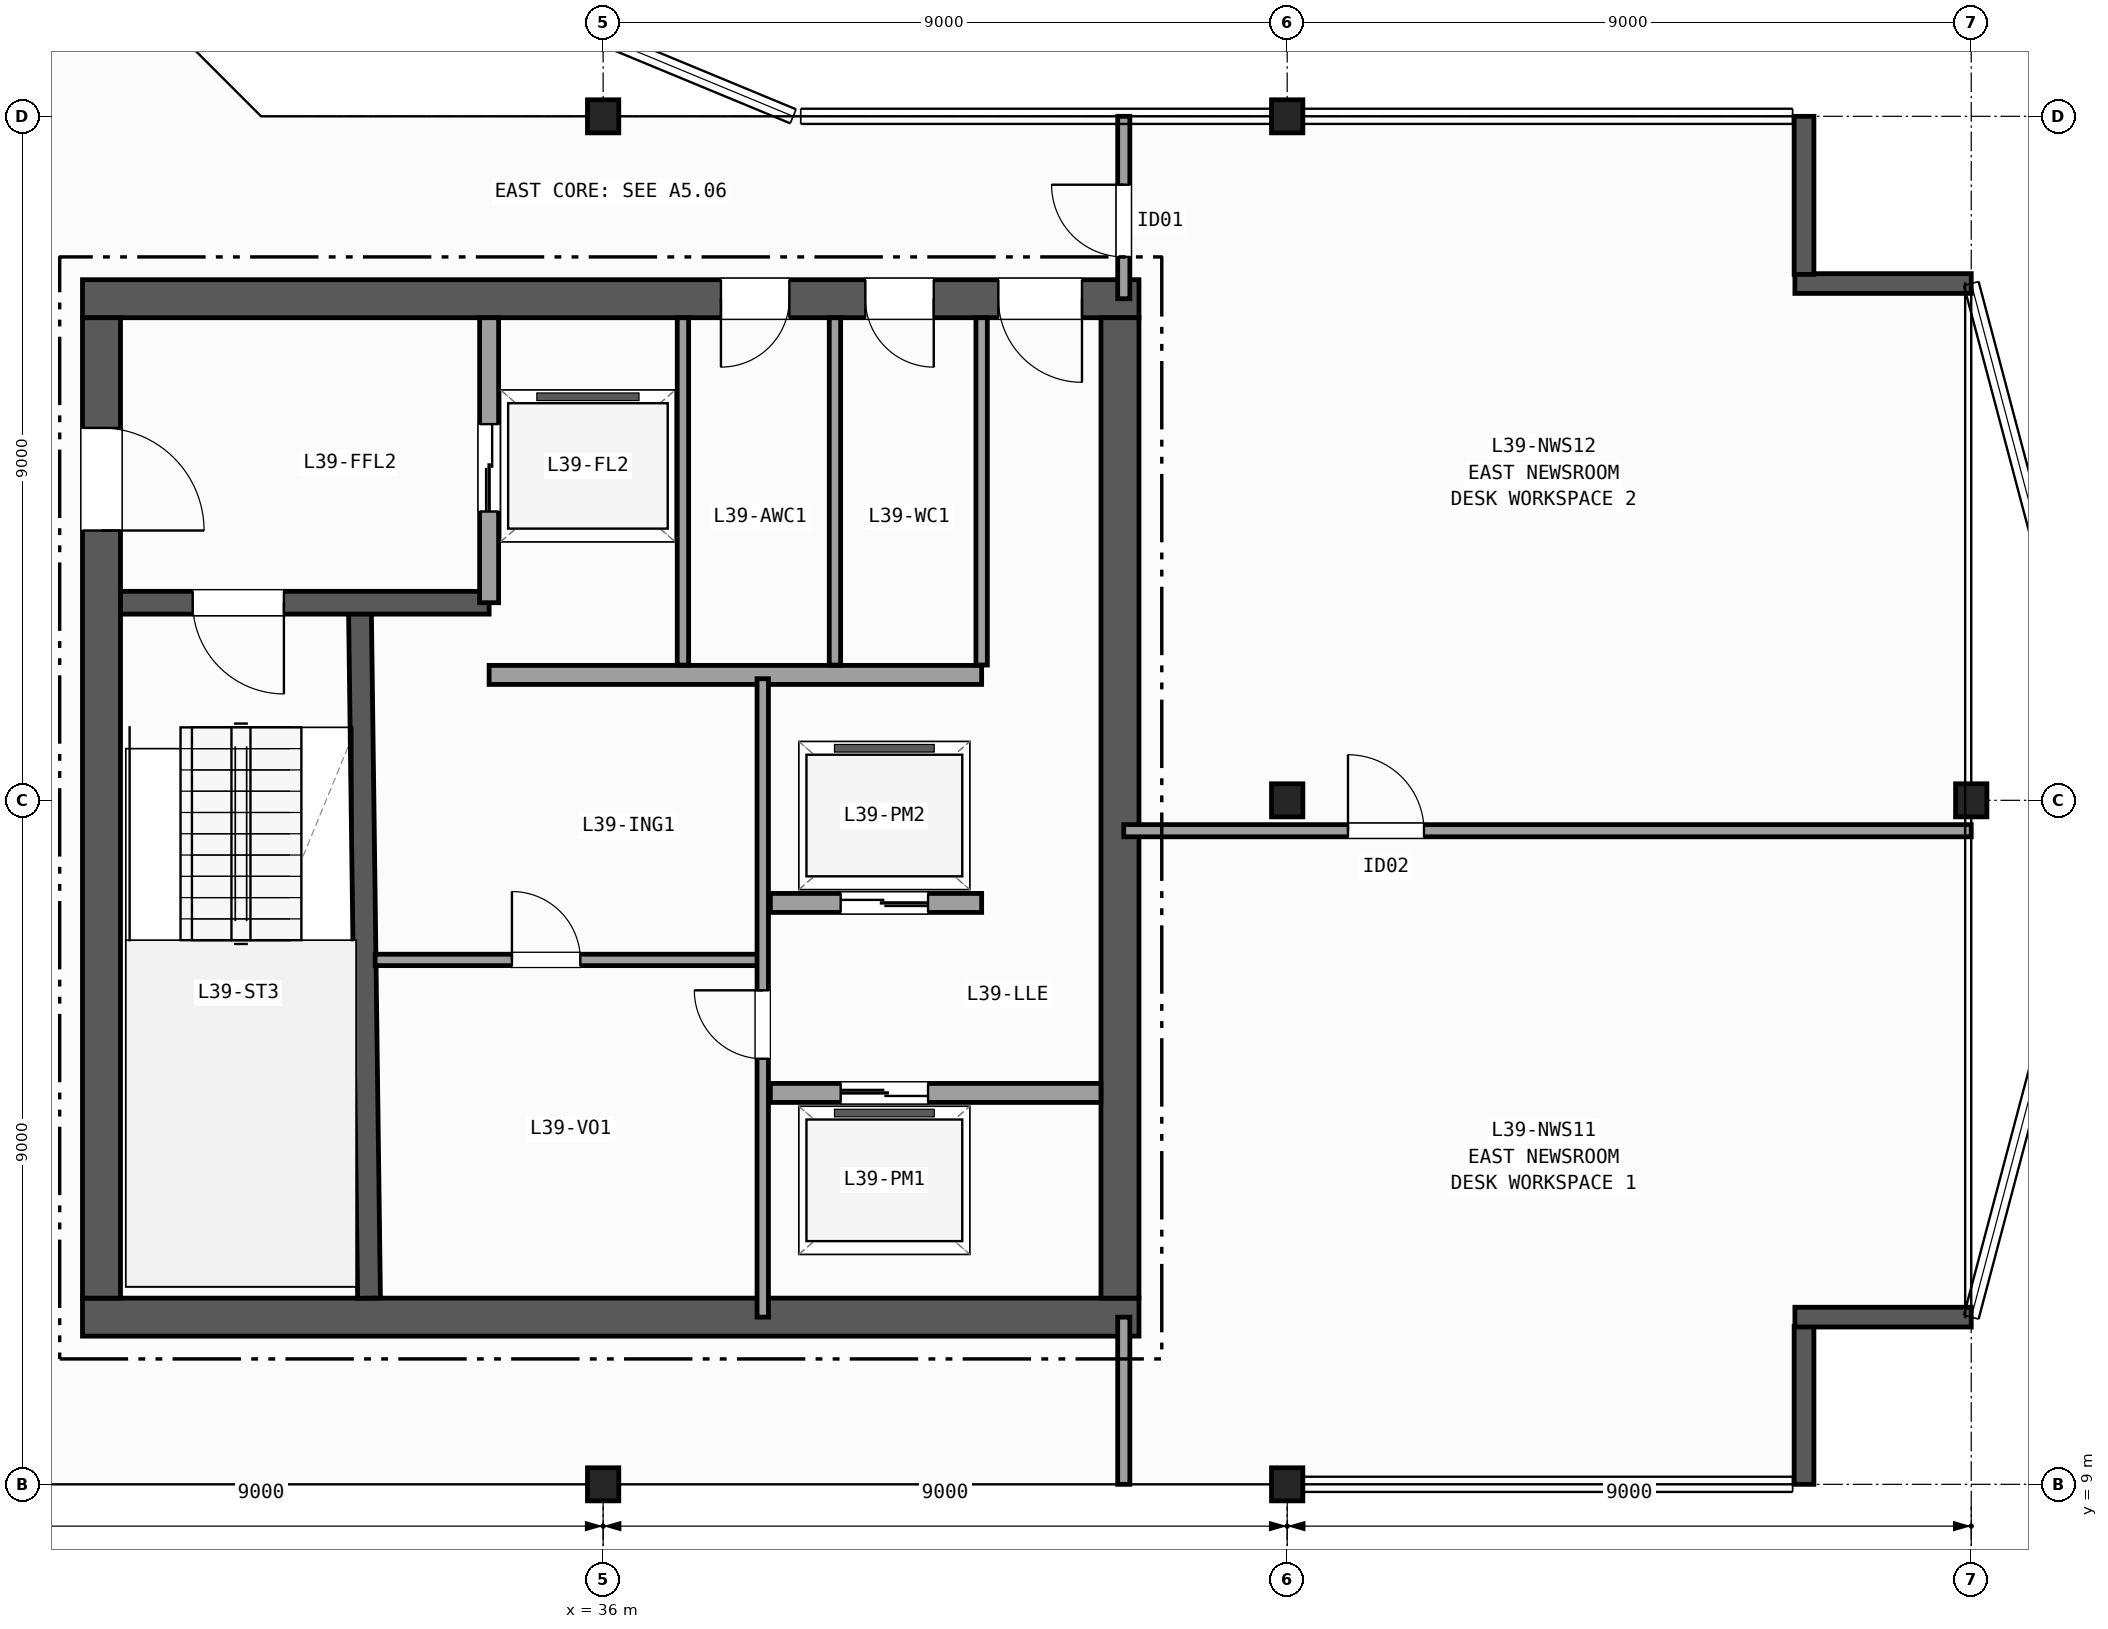
"""IFC4 building model, lengths in metres.
Left out: names, types, materials, properties, quantities, classifications, styles, units other than length and angle.
Written with IfcOpenShell. Run it as: python <this file> out.ifc"""

import sys

from ifc_helpers import new_model, si_unit, direction, frame, frame_2d, origin, origin_2d, place, context, subcontext, project, spatial, rectangle, i_section, extrude, element, fill, save


model = new_model("IFC4")
c1 = context("Model", 3, precision=1e-05, world=origin(), true_north=direction((0.0, 1.0)))
c2 = subcontext(c1, "Body", "Model", "MODEL_VIEW")
j1 = project(units=[si_unit("LENGTHUNIT", "METRE"), si_unit("PLANEANGLEUNIT", "RADIAN")], contexts=[c1])
p1 = place(None, origin())
s1 = spatial("IfcSite", under=j1, at=p1, CompositionType="ELEMENT")
p2 = place(p1, origin())
s2 = spatial("IfcBuilding", under=s1, at=p2, CompositionType="ELEMENT")
p3 = place(p2, frame((0.0, 0.0, 158.1)))
s3 = spatial("IfcBuildingStorey", under=s2, at=p3, CompositionType="ELEMENT", Elevation=158.1)
for number, where, z_axis, x_axis in (
    (1, (36.0, 9.0, 0.0), (0.0, 0.0, 1.0), (1.0, 0.0, 0.0)),
    (2, (36.0, 27.0, 0.0), (0.0, 0.0, 1.0), (1.0, 0.0, 0.0)),
    (3, (45.0, 9.0, 0.0), (0.0, 0.0, 1.0), (1.0, 0.0, 0.0)),
    (4, (45.0, 18.0, 0.0), (0.0, 0.0, 1.0), (1.0, 0.0, 0.0)),
    (5, (45.0, 27.0, 0.0), (0.0, 0.0, 1.0), (1.0, 0.0, 0.0)),
    (6, (54.0, 18.0, 0.0), (0.0, 0.0, 1.0), (1.0, 0.0, 0.0)),
):
    element("IfcColumn", number, at=place(p3, frame(where, z_axis=z_axis, x_axis=x_axis)), inside=s3, PredefinedType="COLUMN", context=c2, shape_type="SweptSolid", body=[
        extrude(i_section(OverallWidth=0.412, OverallDepth=0.435, WebThickness=0.036, FlangeThickness=0.057, FilletRadius=0.015, at=origin_2d()), origin(), (0.0, 0.0, 1.0), 3.7),
    ])
p4 = place(p3, frame((51.8, 9.0, 0.0), z_axis=(0.0, 0.0, 1.0), x_axis=(0.0, 1.0, 0.0)))
e7 = element("IfcWall", 7, at=p4, inside=s3, PredefinedType="SOLIDWALL", context=c2, shape_type="SweptSolid", body=[
    extrude(rectangle(XDim=2.08, YDim=0.26, at=frame_2d((1.04, 0.0))), origin(), (0.0, 0.0, 1.0), 3.42),
])
for number, where, z_axis, x_axis in (
    (8, (51.68, 11.2, 0.0), (0.0, 0.0, 1.0), (1.0, 0.0, 0.0)),
    (9, (54.0, 24.8, 0.0), (0.0, 0.0, 1.0), (-1.0, 0.0, 0.0)),
):
    element("IfcWall", number, at=place(p3, frame(where, z_axis=z_axis, x_axis=x_axis)), inside=s3, PredefinedType="SOLIDWALL", context=c2, shape_type="SweptSolid", body=[
        extrude(rectangle(XDim=2.32, YDim=0.26, at=frame_2d((1.16, 0.0))), origin(), (0.0, 0.0, 1.0), 3.42),
    ])
p5 = place(p3, frame((51.8, 24.92, 0.0), z_axis=(0.0, 0.0, 1.0), x_axis=(0.0, 1.0, 0.0)))
e10 = element("IfcWall", 10, at=p5, inside=s3, PredefinedType="SOLIDWALL", context=c2, shape_type="SweptSolid", body=[
    extrude(rectangle(XDim=2.08, YDim=0.26, at=frame_2d((1.04, 0.0))), origin(), (0.0, 0.0, 1.0), 3.42),
])
p6 = place(p3, frame((29.15, 11.2, 0.0), z_axis=(0.0, 0.0, 1.0), x_axis=(1.0, 0.0, 0.0)))
e11 = element("IfcWall", 11, at=p6, inside=s3, PredefinedType="SHEAR", context=c2, shape_type="SweptSolid", body=[
    extrude(rectangle(XDim=13.9, YDim=0.5, at=frame_2d((6.95, 0.0))), origin(), (0.0, 0.0, 1.0), 3.42),
])
p7 = place(p3, frame((43.05, 24.6, 0.0), z_axis=(0.0, 0.0, 1.0), x_axis=(-1.0, 0.0, 0.0)))
e12 = element("IfcWall", 12, at=p7, inside=s3, PredefinedType="SHEAR", context=c2, shape_type="SweptSolid", body=[
    extrude(rectangle(XDim=13.9, YDim=0.5, at=frame_2d((6.95, 0.0))), origin(), (0.0, 0.0, 1.0), 3.42),
])
p8 = place(p7, frame((0.75, 0.0, 0.0)))
e13 = element("IfcOpeningElement", 13, at=p8, cuts=e12, PredefinedType="OPENING", context=c2, shape_type="SweptSolid", body=[
    extrude(rectangle(XDim=1.1, YDim=2.15, at=frame_2d((0.55, 1.075))), frame((0.0, 0.26, 0.0), z_axis=(0.0, -1.0, 0.0), x_axis=(1.0, 0.0, 0.0)), (0.0, 0.0, 1.0), 0.52),
])
p9 = place(p7, frame((2.7, 0.0, 0.0)))
e14 = element("IfcOpeningElement", 14, at=p9, cuts=e12, PredefinedType="OPENING", context=c2, shape_type="SweptSolid", body=[
    extrude(rectangle(XDim=0.9, YDim=2.1, at=frame_2d((0.45, 1.05))), frame((0.0, 0.26, 0.0), z_axis=(0.0, -1.0, 0.0), x_axis=(1.0, 0.0, 0.0)), (0.0, 0.0, 1.0), 0.52),
])
p10 = place(p7, frame((4.6, 0.0, 0.0)))
e15 = element("IfcOpeningElement", 15, at=p10, cuts=e12, PredefinedType="OPENING", context=c2, shape_type="SweptSolid", body=[
    extrude(rectangle(XDim=0.9, YDim=2.1, at=frame_2d((0.45, 1.05))), frame((0.0, 0.26, 0.0), z_axis=(0.0, -1.0, 0.0), x_axis=(1.0, 0.0, 0.0)), (0.0, 0.0, 1.0), 0.52),
])
p11 = place(p3, frame((29.4, 24.35, 0.0), z_axis=(0.0, 0.0, 1.0), x_axis=(0.0, -1.0, 0.0)))
e16 = element("IfcWall", 16, at=p11, inside=s3, PredefinedType="SHEAR", context=c2, shape_type="SweptSolid", body=[
    extrude(rectangle(XDim=12.9, YDim=0.5, at=frame_2d((6.45, 0.0))), origin(), (0.0, 0.0, 1.0), 3.42),
])
p12 = place(p11, frame((1.45, 0.0, 0.0)))
e17 = element("IfcOpeningElement", 17, at=p12, cuts=e16, PredefinedType="OPENING", context=c2, shape_type="SweptSolid", body=[
    extrude(rectangle(XDim=1.35, YDim=2.15, at=frame_2d((0.675, 1.075))), frame((0.0, 0.26, 0.0), z_axis=(0.0, -1.0, 0.0), x_axis=(1.0, 0.0, 0.0)), (0.0, 0.0, 1.0), 0.52),
])
p13 = place(p3, frame((42.8, 11.45, 0.0), z_axis=(0.0, 0.0, 1.0), x_axis=(0.0, 1.0, 0.0)))
e18 = element("IfcWall", 18, at=p13, inside=s3, PredefinedType="SHEAR", context=c2, shape_type="SweptSolid", body=[
    extrude(rectangle(XDim=12.9, YDim=0.5, at=frame_2d((6.45, 0.0))), origin(), (0.0, 0.0, 1.0), 3.42),
])
p14 = place(p3, frame((32.92, 11.45, 0.0), z_axis=(0.0, 0.0, 1.0), x_axis=(-0.013171578211, 0.999913251001, 0.0)))
e19 = element("IfcWall", 19, at=p14, inside=s3, PredefinedType="SHEAR", context=c2, shape_type="SweptSolid", body=[
    extrude(rectangle(XDim=9.101, YDim=0.3, at=frame_2d((4.55, 0.0))), origin(), (0.0, 0.0, 1.0), 3.42),
])
p15 = place(p3, frame((34.5, 20.6, 0.0), z_axis=(0.0, 0.0, 1.0), x_axis=(-1.0, 0.0, 0.0)))
e20 = element("IfcWall", 20, at=p15, inside=s3, PredefinedType="SHEAR", context=c2, shape_type="SweptSolid", body=[
    extrude(rectangle(XDim=4.85, YDim=0.3, at=frame_2d((2.425, 0.0))), origin(), (0.0, 0.0, 1.0), 3.42),
])
p16 = place(p15, frame((2.7, 0.0, 0.0)))
e21 = element("IfcOpeningElement", 21, at=p16, cuts=e20, PredefinedType="OPENING", context=c2, shape_type="SweptSolid", body=[
    extrude(rectangle(XDim=1.2, YDim=2.15, at=frame_2d((0.6, 1.075))), frame((0.0, 0.16, 0.0), z_axis=(0.0, -1.0, 0.0), x_axis=(1.0, 0.0, 0.0)), (0.0, 0.0, 1.0), 0.32),
])
p17 = place(p3, frame((34.5, 20.6, 0.0), z_axis=(0.0, 0.0, 1.0), x_axis=(0.0, 1.0, 0.0)))
e22 = element("IfcWall", 22, at=p17, inside=s3, PredefinedType="PARTITIONING", context=c2, shape_type="SweptSolid", body=[
    extrude(rectangle(XDim=3.75, YDim=0.25, at=frame_2d((1.875, 0.0))), origin(), (0.0, 0.0, 1.0), 3.42),
])
p18 = place(p17, frame((1.2, 0.0, 0.0)))
e23 = element("IfcOpeningElement", 23, at=p18, cuts=e22, PredefinedType="OPENING", context=c2, shape_type="SweptSolid", body=[
    extrude(rectangle(XDim=1.15, YDim=2.15, at=frame_2d((0.575, 1.075))), frame((0.0, 0.135, 0.0), z_axis=(0.0, -1.0, 0.0), x_axis=(1.0, 0.0, 0.0)), (0.0, 0.0, 1.0), 0.27),
])
p19 = place(p3, frame((34.5, 19.65, 0.0), z_axis=(0.0, 0.0, 1.0), x_axis=(1.0, 0.0, 0.0)))
e24 = element("IfcWall", 24, at=p19, inside=s3, PredefinedType="PARTITIONING", context=c2, shape_type="SweptSolid", body=[
    extrude(rectangle(XDim=6.48, YDim=0.25, at=frame_2d((3.24, 0.0))), origin(), (0.0, 0.0, 1.0), 3.42),
])
p20 = place(p3, frame((38.2, 14.15, 0.0), z_axis=(0.0, 0.0, 1.0), x_axis=(1.0, 0.0, 0.0)))
e25 = element("IfcWall", 25, at=p20, inside=s3, PredefinedType="PARTITIONING", context=c2, shape_type="SweptSolid", body=[
    extrude(rectangle(XDim=4.35, YDim=0.25, at=frame_2d((2.175, 0.0))), origin(), (0.0, 0.0, 1.0), 3.42),
])
p21 = place(p20, frame((0.925, 0.0, 0.0)))
e26 = element("IfcOpeningElement", 26, at=p21, cuts=e25, PredefinedType="OPENING", context=c2, shape_type="SweptSolid", body=[
    extrude(rectangle(XDim=1.15, YDim=2.15, at=frame_2d((0.575, 1.075))), frame((0.0, 0.135, 0.0), z_axis=(0.0, -1.0, 0.0), x_axis=(1.0, 0.0, 0.0)), (0.0, 0.0, 1.0), 0.27),
])
p22 = place(p3, frame((40.98, 16.65, 0.0), z_axis=(0.0, 0.0, 1.0), x_axis=(-1.0, 0.0, 0.0)))
e27 = element("IfcWall", 27, at=p22, inside=s3, PredefinedType="PARTITIONING", context=c2, shape_type="SweptSolid", body=[
    extrude(rectangle(XDim=2.78, YDim=0.25, at=frame_2d((1.39, 0.0))), origin(), (0.0, 0.0, 1.0), 3.42),
])
p23 = place(p22, frame((0.705, 0.0, 0.0)))
e28 = element("IfcOpeningElement", 28, at=p23, cuts=e27, PredefinedType="OPENING", context=c2, shape_type="SweptSolid", body=[
    extrude(rectangle(XDim=1.15, YDim=2.15, at=frame_2d((0.575, 1.075))), frame((0.0, 0.135, 0.0), z_axis=(0.0, -1.0, 0.0), x_axis=(1.0, 0.0, 0.0)), (0.0, 0.0, 1.0), 0.27),
])
p24 = place(p3, frame((33.0, 15.9, 0.0), z_axis=(0.0, 0.0, 1.0), x_axis=(1.0, 0.0, 0.0)))
e29 = element("IfcWall", 29, at=p24, inside=s3, PredefinedType="PARTITIONING", context=c2, shape_type="SweptSolid", body=[
    extrude(rectangle(XDim=5.1, YDim=0.15, at=frame_2d((2.55, 0.0))), origin(), (0.0, 0.0, 1.0), 3.42),
])
p25 = place(p24, frame((1.8, 0.0, 0.0)))
e30 = element("IfcOpeningElement", 30, at=p25, cuts=e29, PredefinedType="OPENING", context=c2, shape_type="SweptSolid", body=[
    extrude(rectangle(XDim=0.9, YDim=2.1, at=frame_2d((0.45, 1.05))), frame((0.0, 0.085, 0.0), z_axis=(0.0, -1.0, 0.0), x_axis=(1.0, 0.0, 0.0)), (0.0, 0.0, 1.0), 0.17),
])
p26 = place(p3, frame((38.1, 11.2, 0.0), z_axis=(0.0, 0.0, 1.0), x_axis=(0.0, 1.0, 0.0)))
e31 = element("IfcWall", 31, at=p26, inside=s3, PredefinedType="PARTITIONING", context=c2, shape_type="SweptSolid", body=[
    extrude(rectangle(XDim=8.4, YDim=0.15, at=frame_2d((4.2, 0.0))), origin(), (0.0, 0.0, 1.0), 3.42),
])
p27 = place(p26, frame((3.4, 0.0, 0.0)))
e32 = element("IfcOpeningElement", 32, at=p27, cuts=e31, PredefinedType="OPENING", context=c2, shape_type="SweptSolid", body=[
    extrude(rectangle(XDim=0.9, YDim=2.1, at=frame_2d((0.45, 1.05))), frame((0.0, 0.085, 0.0), z_axis=(0.0, -1.0, 0.0), x_axis=(1.0, 0.0, 0.0)), (0.0, 0.0, 1.0), 0.17),
])
for number, where, z_axis, x_axis in (
    (33, (37.05, 19.78, 0.0), (0.0, 0.0, 1.0), (0.0, 1.0, 0.0)),
    (34, (39.05, 19.78, 0.0), (0.0, 0.0, 1.0), (0.0, 1.0, 0.0)),
    (35, (40.98, 19.78, 0.0), (0.0, 0.0, 1.0), (0.0, 1.0, 0.0)),
):
    element("IfcWall", number, at=place(p3, frame(where, z_axis=z_axis, x_axis=x_axis)), inside=s3, PredefinedType="PARTITIONING", context=c2, shape_type="SweptSolid", body=[
        extrude(rectangle(XDim=4.57, YDim=0.15, at=frame_2d((2.285, 0.0))), origin(), (0.0, 0.0, 1.0), 3.42),
    ])
p28 = place(p3, frame((42.85, 9.0, 0.0), z_axis=(0.0, 0.0, 1.0), x_axis=(0.0, 1.0, 0.0)))
e36 = element("IfcWall", 36, at=p28, inside=s3, PredefinedType="PARTITIONING", context=c2, shape_type="SweptSolid", body=[
    extrude(rectangle(XDim=2.2, YDim=0.16, at=frame_2d((1.1, 0.0))), origin(), (0.0, 0.0, 1.0), 2.634),
])
p29 = place(p3, frame((42.85, 24.6, 0.0), z_axis=(0.0, 0.0, 1.0), x_axis=(0.0, 1.0, 0.0)))
e37 = element("IfcWall", 37, at=p29, inside=s3, PredefinedType="PARTITIONING", context=c2, shape_type="SweptSolid", body=[
    extrude(rectangle(XDim=2.4, YDim=0.16, at=frame_2d((1.2, 0.0))), origin(), (0.0, 0.0, 1.0), 2.634),
])
p30 = place(p29, frame((0.55, 0.0, 0.0)))
e38 = element("IfcOpeningElement", 38, at=p30, cuts=e37, PredefinedType="OPENING", context=c2, shape_type="SweptSolid", body=[
    extrude(rectangle(XDim=0.95, YDim=2.1, at=frame_2d((0.475, 1.05))), frame((0.0, 0.09, 0.0), z_axis=(0.0, -1.0, 0.0), x_axis=(1.0, 0.0, 0.0)), (0.0, 0.0, 1.0), 0.18),
])
p31 = place(p3, frame((42.85, 17.6, 0.0), z_axis=(0.0, 0.0, 1.0), x_axis=(1.0, 0.0, 0.0)))
e39 = element("IfcWall", 39, at=p31, inside=s3, PredefinedType="PARTITIONING", context=c2, shape_type="SweptSolid", body=[
    extrude(rectangle(XDim=11.15, YDim=0.16, at=frame_2d((5.575, 0.0))), origin(), (0.0, 0.0, 1.0), 3.42),
])
p32 = place(p31, frame((2.95, 0.0, 0.0)))
e40 = element("IfcOpeningElement", 40, at=p32, cuts=e39, PredefinedType="OPENING", context=c2, shape_type="SweptSolid", body=[
    extrude(rectangle(XDim=1.0, YDim=2.1, at=frame_2d((0.5, 1.05))), frame((0.0, 0.09, 0.0), z_axis=(0.0, -1.0, 0.0), x_axis=(1.0, 0.0, 0.0)), (0.0, 0.0, 1.0), 0.18),
])
p33 = place(p16, origin())
e41 = element("IfcDoor", 41, at=p33, inside=s3, OperationType="SINGLE_SWING_LEFT", PredefinedType="DOOR", context=c2, shape_type="SweptSolid", body=[
    extrude(rectangle(XDim=1.2, YDim=2.15, at=frame_2d((0.6, 1.075))), frame((0.0, 0.025, 0.0), z_axis=(0.0, -1.0, 0.0), x_axis=(1.0, 0.0, 0.0)), (0.0, 0.0, 1.0), 0.05),
])
fill(e21, e41)
p34 = place(p12, origin())
e42 = element("IfcDoor", 42, at=p34, inside=s3, OperationType="SINGLE_SWING_RIGHT", PredefinedType="DOOR", context=c2, shape_type="SweptSolid", body=[
    extrude(rectangle(XDim=1.35, YDim=2.15, at=frame_2d((0.675, 1.075))), frame((0.0, 0.025, 0.0), z_axis=(0.0, -1.0, 0.0), x_axis=(1.0, 0.0, 0.0)), (0.0, 0.0, 1.0), 0.05),
])
fill(e17, e42)
p35 = place(p8, origin())
e43 = element("IfcDoor", 43, at=p35, inside=s3, OperationType="SINGLE_SWING_LEFT", PredefinedType="DOOR", context=c2, shape_type="SweptSolid", body=[
    extrude(rectangle(XDim=1.1, YDim=2.15, at=frame_2d((0.55, 1.075))), frame((0.0, 0.025, 0.0), z_axis=(0.0, -1.0, 0.0), x_axis=(1.0, 0.0, 0.0)), (0.0, 0.0, 1.0), 0.05),
])
fill(e13, e43)
p36 = place(p9, origin())
e44 = element("IfcDoor", 44, at=p36, inside=s3, OperationType="SINGLE_SWING_LEFT", PredefinedType="DOOR", context=c2, shape_type="SweptSolid", body=[
    extrude(rectangle(XDim=0.9, YDim=2.1, at=frame_2d((0.45, 1.05))), frame((0.0, 0.025, 0.0), z_axis=(0.0, -1.0, 0.0), x_axis=(1.0, 0.0, 0.0)), (0.0, 0.0, 1.0), 0.05),
])
fill(e14, e44)
p37 = place(p10, origin())
e45 = element("IfcDoor", 45, at=p37, inside=s3, OperationType="SINGLE_SWING_RIGHT", PredefinedType="DOOR", context=c2, shape_type="SweptSolid", body=[
    extrude(rectangle(XDim=0.9, YDim=2.1, at=frame_2d((0.45, 1.05))), frame((0.0, 0.025, 0.0), z_axis=(0.0, -1.0, 0.0), x_axis=(1.0, 0.0, 0.0)), (0.0, 0.0, 1.0), 0.05),
])
fill(e15, e45)
p38 = place(p18, origin())
e46 = element("IfcDoor", 46, at=p38, inside=s3, OperationType="DOUBLE_DOOR_SLIDING", PredefinedType="DOOR", context=c2, shape_type="SweptSolid", body=[
    extrude(rectangle(XDim=1.15, YDim=2.15, at=frame_2d((0.575, 1.075))), frame((0.0, 0.025, 0.0), z_axis=(0.0, -1.0, 0.0), x_axis=(1.0, 0.0, 0.0)), (0.0, 0.0, 1.0), 0.05),
])
fill(e23, e46)
p39 = place(p21, origin())
e47 = element("IfcDoor", 47, at=p39, inside=s3, OperationType="DOUBLE_DOOR_SLIDING", PredefinedType="DOOR", context=c2, shape_type="SweptSolid", body=[
    extrude(rectangle(XDim=1.15, YDim=2.15, at=frame_2d((0.575, 1.075))), frame((0.0, 0.025, 0.0), z_axis=(0.0, -1.0, 0.0), x_axis=(1.0, 0.0, 0.0)), (0.0, 0.0, 1.0), 0.05),
])
fill(e26, e47)
p40 = place(p23, origin())
e48 = element("IfcDoor", 48, at=p40, inside=s3, OperationType="DOUBLE_DOOR_SLIDING", PredefinedType="DOOR", context=c2, shape_type="SweptSolid", body=[
    extrude(rectangle(XDim=1.15, YDim=2.15, at=frame_2d((0.575, 1.075))), frame((0.0, 0.025, 0.0), z_axis=(0.0, -1.0, 0.0), x_axis=(1.0, 0.0, 0.0)), (0.0, 0.0, 1.0), 0.05),
])
fill(e28, e48)
p41 = place(p27, origin())
e49 = element("IfcDoor", 49, at=p41, inside=s3, OperationType="SINGLE_SWING_RIGHT", PredefinedType="DOOR", context=c2, shape_type="SweptSolid", body=[
    extrude(rectangle(XDim=0.9, YDim=2.1, at=frame_2d((0.45, 1.05))), frame((0.0, 0.025, 0.0), z_axis=(0.0, -1.0, 0.0), x_axis=(1.0, 0.0, 0.0)), (0.0, 0.0, 1.0), 0.05),
])
fill(e32, e49)
p42 = place(p25, origin())
e50 = element("IfcDoor", 50, at=p42, inside=s3, OperationType="SINGLE_SWING_LEFT", PredefinedType="DOOR", context=c2, shape_type="SweptSolid", body=[
    extrude(rectangle(XDim=0.9, YDim=2.1, at=frame_2d((0.45, 1.05))), frame((0.0, 0.025, 0.0), z_axis=(0.0, -1.0, 0.0), x_axis=(1.0, 0.0, 0.0)), (0.0, 0.0, 1.0), 0.05),
])
fill(e30, e50)
p43 = place(p30, origin())
e51 = element("IfcDoor", 51, at=p43, inside=s3, OperationType="SINGLE_SWING_RIGHT", PredefinedType="DOOR", context=c2, shape_type="SweptSolid", body=[
    extrude(rectangle(XDim=0.95, YDim=2.1, at=frame_2d((0.475, 1.05))), frame((0.0, 0.025, 0.0), z_axis=(0.0, -1.0, 0.0), x_axis=(1.0, 0.0, 0.0)), (0.0, 0.0, 1.0), 0.05),
])
fill(e38, e51)
p44 = place(p32, origin())
e52 = element("IfcDoor", 52, at=p44, inside=s3, OperationType="SINGLE_SWING_LEFT", PredefinedType="DOOR", context=c2, shape_type="SweptSolid", body=[
    extrude(rectangle(XDim=1.0, YDim=2.1, at=frame_2d((0.5, 1.05))), frame((0.0, 0.025, 0.0), z_axis=(0.0, -1.0, 0.0), x_axis=(1.0, 0.0, 0.0)), (0.0, 0.0, 1.0), 0.05),
])
fill(e40, e52)
save(model, sys.argv[1])
